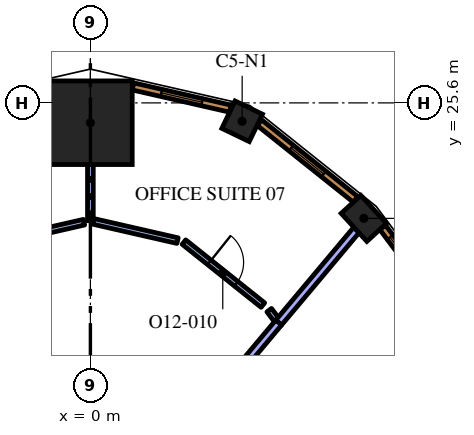
"""IFC4 building model, lengths in metres.
Left out: names, types, materials, properties, quantities, classifications, styles, units other than length and angle.
Written with IfcOpenShell. Run it as: python <this file> out.ifc"""

import sys

from ifc_helpers import new_model, si_unit, direction, frame, frame_2d, origin, origin_2d, place, context, subcontext, project, spatial, rectangle, extrude, element, fill, save


model = new_model("IFC4")
c1 = context("Model", 3, precision=1e-05, world=origin(), true_north=direction((0.0, 1.0)))
c2 = subcontext(c1, "Body", "Model", "MODEL_VIEW")
j1 = project(units=[si_unit("LENGTHUNIT", "METRE"), si_unit("PLANEANGLEUNIT", "RADIAN")], contexts=[c1])
p1 = place(None, origin())
s1 = spatial("IfcSite", under=j1, at=p1, CompositionType="ELEMENT")
p2 = place(p1, origin())
s2 = spatial("IfcBuilding", under=s1, at=p2, CompositionType="ELEMENT")
p3 = place(p2, frame((0.0, 0.0, 279.6)))
s3 = spatial("IfcBuildingStorey", under=s2, at=p3, CompositionType="ELEMENT", Elevation=279.6)
p4 = place(p3, frame((0.0, 25.078, 0.0), z_axis=(0.0, 0.0, 1.0), x_axis=(0.0, 1.0, 0.0)))
e1 = element("IfcColumn", 1, at=p4, inside=s3, PredefinedType="COLUMN", context=c2, shape_type="SweptSolid", body=[
    extrude(rectangle(XDim=2.2, YDim=2.2, at=origin_2d()), origin(), (0.0, 0.0, 1.0), 4.2),
])
p5 = place(p3, frame((7.195, 22.561, 0.0), z_axis=(0.0, 0.0, 1.0), x_axis=(-0.67580250023, 0.737082750228, 0.0)))
e2 = element("IfcColumn", 2, at=p5, inside=s3, PredefinedType="COLUMN", context=c2, shape_type="SweptSolid", body=[
    extrude(rectangle(XDim=1.0, YDim=0.7, at=origin_2d()), origin(), (0.0, 0.0, 1.0), 4.2),
])
p6 = place(p3, frame((3.993, 25.116, 0.0), z_axis=(0.0, 0.0, 1.0), x_axis=(-0.900873321869, 0.434082086644, 0.0)))
e3 = element("IfcColumn", 3, at=p6, inside=s3, PredefinedType="COLUMN", context=c2, shape_type="SweptSolid", body=[
    extrude(rectangle(XDim=0.8, YDim=0.8, at=origin_2d()), origin(), (0.0, 0.0, 1.0), 4.2),
])
p7 = place(p3, frame((4.95, 19.814, 0.0), z_axis=(0.0, 0.0, 1.0), x_axis=(0.642981953866, 0.765881326971, 0.0)))
e4 = element("IfcWall", 4, at=p7, inside=s3, PredefinedType="PARTITIONING", context=c2, shape_type="SweptSolid", body=[
    extrude(rectangle(XDim=3.188, YDim=0.2, at=frame_2d((1.594, 0.0))), origin(), (0.0, 0.0, 1.0), 3.55),
])
p8 = place(p3, frame((3.483, 18.067, 0.0), z_axis=(0.0, 0.0, 1.0), x_axis=(0.642896944312, 0.765952687177, 0.0)))
e5 = element("IfcWall", 5, at=p8, inside=s3, PredefinedType="PARTITIONING", context=c2, shape_type="SweptSolid", body=[
    extrude(rectangle(XDim=2.29, YDim=0.2, at=frame_2d((1.145, 0.0))), origin(), (0.0, 0.0, 1.0), 3.55),
])
p9 = place(p3, frame((0.0, 22.5, 0.0), z_axis=(0.0, 0.0, 1.0), x_axis=(0.0, 1.0, 0.0)))
e6 = element("IfcWall", 6, at=p9, inside=s3, PredefinedType="PARTITIONING", context=c2, shape_type="SweptSolid", body=[
    extrude(rectangle(XDim=1.479, YDim=0.15, at=frame_2d((0.739, 0.0))), origin(), (0.0, 0.0, 1.0), 3.55),
])
p10 = place(p3, frame((4.891, 19.899, 0.0), z_axis=(0.0, 0.0, 1.0), x_axis=(-0.6, 0.8, 0.0)))
e7 = element("IfcWall", 7, at=p10, inside=s3, PredefinedType="PARTITIONING", context=c2, shape_type="SweptSolid", body=[
    extrude(rectangle(XDim=0.309, YDim=0.15, at=frame_2d((0.154, 0.0))), origin(), (0.0, 0.0, 1.0), 3.55),
])
p11 = place(p3, frame((2.462, 21.937, 0.0), z_axis=(0.0, 0.0, 1.0), x_axis=(0.781630346222, -0.62374193531, 0.0)))
e8 = element("IfcWall", 8, at=p11, inside=s3, PredefinedType="PARTITIONING", context=c2, shape_type="SweptSolid", body=[
    extrude(rectangle(XDim=2.656, YDim=0.15, at=frame_2d((1.328, 0.0))), origin(), (0.0, 0.0, 1.0), 3.55),
])
p12 = place(p11, frame((0.857, 0.0, 0.0)))
e9 = element("IfcOpeningElement", 9, at=p12, cuts=e8, PredefinedType="OPENING", context=c2, shape_type="SweptSolid", body=[
    extrude(rectangle(XDim=0.9, YDim=2.1, at=frame_2d((0.45, 1.05))), frame((0.0, 0.085, 0.0), z_axis=(0.0, -1.0, 0.0), x_axis=(1.0, 0.0, 0.0)), (0.0, 0.0, 1.0), 0.17),
])
p13 = place(p3, frame((2.293, 21.976, 0.0), z_axis=(0.0, 0.0, 1.0), x_axis=(-0.974905760283, 0.22261796551, 0.0)))
e10 = element("IfcWall", 10, at=p13, inside=s3, PredefinedType="PARTITIONING", context=c2, shape_type="SweptSolid", body=[
    extrude(rectangle(XDim=2.276, YDim=0.15, at=frame_2d((1.138, 0.0))), origin(), (0.0, 0.0, 1.0), 3.55),
])
p14 = place(p3, frame((-0.168, 22.461, 0.0), z_axis=(0.0, 0.0, 1.0), x_axis=(-0.974885550769, -0.222706450069, 0.0)))
e11 = element("IfcWall", 11, at=p14, inside=s3, PredefinedType="PARTITIONING", context=c2, shape_type="SweptSolid", body=[
    extrude(rectangle(XDim=2.353, YDim=0.15, at=frame_2d((1.176, 0.0))), origin(), (0.0, 0.0, 1.0), 3.55),
])
p15 = place(p3, frame((10.938, 17.99, 0.0), z_axis=(0.0, 0.0, 1.0), x_axis=(-0.599559865294, 0.800329911929, 0.0)))
e12 = element("IfcWall", 12, at=p15, inside=s3, PredefinedType="SOLIDWALL", context=c2, shape_type="SweptSolid", body=[
    extrude(rectangle(XDim=5.415, YDim=0.19, at=frame_2d((2.708, 0.0))), origin(), (0.0, 0.0, 1.0), 3.95),
])
p16 = place(p15, frame((0.358, 0.0, 0.6)))
e13 = element("IfcOpeningElement", 13, at=p16, cuts=e12, PredefinedType="OPENING", context=c2, shape_type="SweptSolid", body=[
    extrude(rectangle(XDim=1.5, YDim=2.85, at=frame_2d((0.75, 1.425))), frame((0.0, 0.105, 0.0), z_axis=(0.0, -1.0, 0.0), x_axis=(1.0, 0.0, 0.0)), (0.0, 0.0, 1.0), 0.21),
])
p17 = place(p15, frame((3.593, 0.0, 0.6)))
e14 = element("IfcOpeningElement", 14, at=p17, cuts=e12, PredefinedType="OPENING", context=c2, shape_type="SweptSolid", body=[
    extrude(rectangle(XDim=1.5, YDim=2.85, at=frame_2d((0.75, 1.425))), frame((0.0, 0.105, 0.0), z_axis=(0.0, -1.0, 0.0), x_axis=(1.0, 0.0, 0.0)), (0.0, 0.0, 1.0), 0.21),
])
p18 = place(p3, frame((6.977, 23.061, 0.0), z_axis=(0.0, 0.0, 1.0), x_axis=(-0.781626234064, 0.623747088349, 0.0)))
e15 = element("IfcWall", 15, at=p18, inside=s3, PredefinedType="SOLIDWALL", context=c2, shape_type="SweptSolid", body=[
    extrude(rectangle(XDim=3.237, YDim=0.19, at=frame_2d((1.618, 0.0))), origin(), (0.0, 0.0, 1.0), 3.95),
])
p19 = place(p18, frame((1.068, 0.0, 0.6)))
e16 = element("IfcOpeningElement", 16, at=p19, cuts=e15, PredefinedType="OPENING", context=c2, shape_type="SweptSolid", body=[
    extrude(rectangle(XDim=1.1, YDim=2.85, at=frame_2d((0.55, 1.425))), frame((0.0, 0.105, 0.0), z_axis=(0.0, -1.0, 0.0), x_axis=(1.0, 0.0, 0.0)), (0.0, 0.0, 1.0), 0.21),
])
p20 = place(p3, frame((3.683, 25.449, 0.0), z_axis=(0.0, 0.0, 1.0), x_axis=(-0.974913273386, 0.222585060988, 0.0)))
e17 = element("IfcWall", 17, at=p20, inside=s3, PredefinedType="SOLIDWALL", context=c2, shape_type="SweptSolid", body=[
    extrude(rectangle(XDim=2.627, YDim=0.19, at=frame_2d((1.313, 0.0))), origin(), (0.0, 0.0, 1.0), 3.95),
])
p21 = place(p20, frame((0.763, 0.0, 0.6)))
e18 = element("IfcOpeningElement", 18, at=p21, cuts=e17, PredefinedType="OPENING", context=c2, shape_type="SweptSolid", body=[
    extrude(rectangle(XDim=1.1, YDim=2.85, at=frame_2d((0.55, 1.425))), frame((0.0, 0.105, 0.0), z_axis=(0.0, -1.0, 0.0), x_axis=(1.0, 0.0, 0.0)), (0.0, 0.0, 1.0), 0.21),
])
p22 = place(p12, origin())
e19 = element("IfcDoor", 19, at=p22, inside=s3, OperationType="SINGLE_SWING_LEFT", PredefinedType="DOOR", context=c2, shape_type="SweptSolid", body=[
    extrude(rectangle(XDim=0.9, YDim=2.1, at=frame_2d((0.45, 1.05))), frame((0.0, 0.025, 0.0), z_axis=(0.0, -1.0, 0.0), x_axis=(1.0, 0.0, 0.0)), (0.0, 0.0, 1.0), 0.05),
])
fill(e9, e19)
p23 = place(p17, origin())
e20 = element("IfcWindow", 20, at=p23, inside=s3, PartitioningType="SINGLE_PANEL", PredefinedType="WINDOW", context=c2, shape_type="SweptSolid", body=[
    extrude(rectangle(XDim=1.5, YDim=2.85, at=frame_2d((0.75, 1.425))), frame((0.0, 0.045, 0.0), z_axis=(0.0, -1.0, 0.0), x_axis=(1.0, 0.0, 0.0)), (0.0, 0.0, 1.0), 0.06),
])
fill(e14, e20)
p24 = place(p19, origin())
e21 = element("IfcWindow", 21, at=p24, inside=s3, PartitioningType="SINGLE_PANEL", PredefinedType="WINDOW", context=c2, shape_type="SweptSolid", body=[
    extrude(rectangle(XDim=1.1, YDim=2.85, at=frame_2d((0.55, 1.425))), frame((0.0, 0.045, 0.0), z_axis=(0.0, -1.0, 0.0), x_axis=(1.0, 0.0, 0.0)), (0.0, 0.0, 1.0), 0.06),
])
fill(e16, e21)
p25 = place(p21, origin())
e22 = element("IfcWindow", 22, at=p25, inside=s3, PartitioningType="SINGLE_PANEL", PredefinedType="WINDOW", context=c2, shape_type="SweptSolid", body=[
    extrude(rectangle(XDim=1.1, YDim=2.85, at=frame_2d((0.55, 1.425))), frame((0.0, 0.045, 0.0), z_axis=(0.0, -1.0, 0.0), x_axis=(1.0, 0.0, 0.0)), (0.0, 0.0, 1.0), 0.06),
])
fill(e18, e22)
save(model, sys.argv[1])
